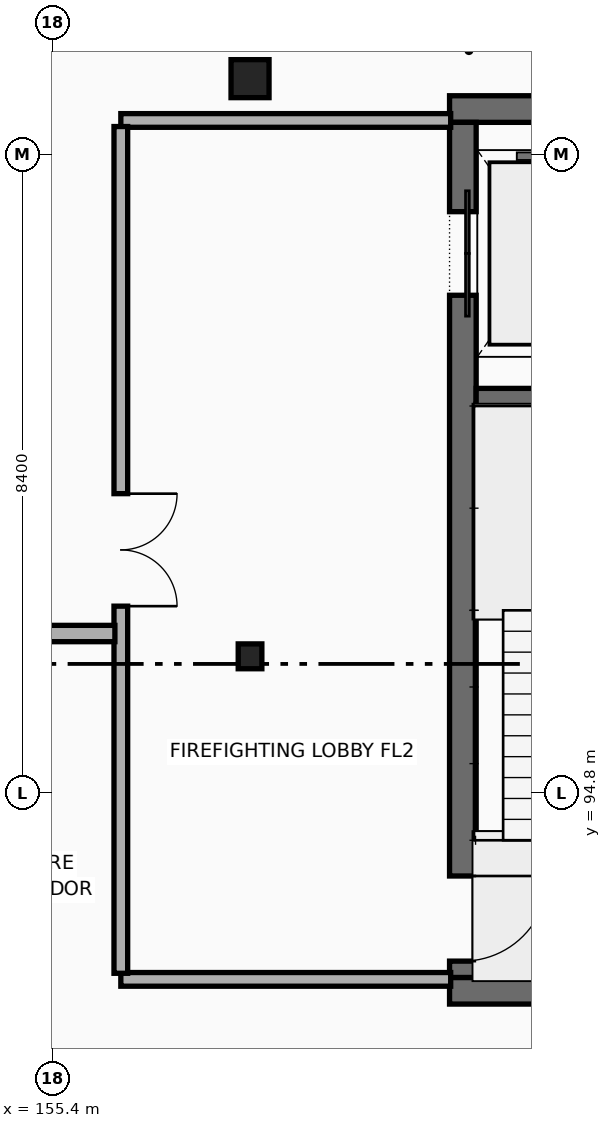
"""IFC4 building model, lengths in metres.
Left out: names, types, materials, properties, quantities, classifications, styles, units other than length and angle.
Written with IfcOpenShell. Run it as: python <this file> out.ifc"""

import sys

from ifc_helpers import new_model, si_unit, direction, frame, frame_2d, origin, origin_2d, place, context, subcontext, project, spatial, rectangle, i_section, extrude, element, fill, save


model = new_model("IFC4")
c1 = context("Model", 3, precision=1e-05, world=origin(), true_north=direction((0.0, 1.0)))
c2 = subcontext(c1, "Body", "Model", "MODEL_VIEW")
j1 = project(units=[si_unit("LENGTHUNIT", "METRE"), si_unit("PLANEANGLEUNIT", "RADIAN")], contexts=[c1])
p1 = place(None, origin())
s1 = spatial("IfcSite", under=j1, at=p1, CompositionType="ELEMENT")
p2 = place(p1, origin())
s2 = spatial("IfcBuilding", under=s1, at=p2, CompositionType="ELEMENT")
p3 = place(p2, frame((0.0, 0.0, -4.2)))
s3 = spatial("IfcBuildingStorey", under=s2, at=p3, CompositionType="ELEMENT", Elevation=-4.2)
for number, where, z_axis, x_axis in (
    (1, (160.625, 92.2, -0.415), (0.0, 0.0, 1.0), (1.0, 0.0, 0.0)),
    (2, (165.375, 103.8, -0.415), (0.0, 0.0, 1.0), (-1.0, 0.0, 0.0)),
):
    element("IfcWall", number, at=place(p3, frame(where, z_axis=z_axis, x_axis=x_axis)), inside=s3, PredefinedType="SHEAR", context=c2, shape_type="SweptSolid", body=[
        extrude(rectangle(XDim=4.75, YDim=0.35, at=frame_2d((2.375, 0.0))), origin(), (0.0, 0.0, 1.0), 4.615),
    ])
p4 = place(p3, frame((160.8, 103.625, -0.415), z_axis=(0.0, 0.0, 1.0), x_axis=(0.0, -1.0, 0.0)))
e3 = element("IfcWall", 3, at=p4, inside=s3, PredefinedType="SHEAR", context=c2, shape_type="SweptSolid", body=[
    extrude(rectangle(XDim=11.25, YDim=0.35, at=frame_2d((5.625, 0.0))), origin(), (0.0, 0.0, 1.0), 4.615),
])
p5 = place(p4, frame((1.175, 0.0, 0.415)))
e4 = element("IfcOpeningElement", 4, at=p5, cuts=e3, PredefinedType="OPENING", context=c2, shape_type="SweptSolid", body=[
    extrude(rectangle(XDim=1.1, YDim=2.2, at=frame_2d((0.55, 1.1))), frame((0.0, 0.185, 0.0), z_axis=(0.0, -1.0, 0.0), x_axis=(1.0, 0.0, 0.0)), (0.0, 0.0, 1.0), 0.37),
])
p6 = place(p4, frame((9.915, 0.0, 0.415)))
e5 = element("IfcOpeningElement", 5, at=p6, cuts=e3, PredefinedType="OPENING", context=c2, shape_type="SweptSolid", body=[
    extrude(rectangle(XDim=1.12, YDim=2.16, at=frame_2d((0.56, 1.08))), frame((0.0, 0.185, 0.0), z_axis=(0.0, -1.0, 0.0), x_axis=(1.0, 0.0, 0.0)), (0.0, 0.0, 1.0), 0.37),
])
p7 = place(p3, frame((160.975, 100.0, -0.415), z_axis=(0.0, 0.0, 1.0), x_axis=(1.0, 0.0, 0.0)))
e6 = element("IfcWall", 6, at=p7, inside=s3, PredefinedType="SHEAR", context=c2, shape_type="SweptSolid", body=[
    extrude(rectangle(XDim=4.05, YDim=0.25, at=frame_2d((2.025, 0.0))), origin(), (0.0, 0.0, 1.0), 4.615),
])
p8 = place(p3, frame((158.0, 96.6, -0.415), z_axis=(0.0, 0.0, 1.0), x_axis=(1.0, 0.0, 0.0)))
e7 = element("IfcColumn", 7, at=p8, inside=s3, PredefinedType="COLUMN", context=c2, shape_type="SweptSolid", body=[
    extrude(i_section(OverallWidth=0.311, OverallDepth=0.327, WebThickness=0.016, FlangeThickness=0.025, at=origin_2d()), origin(), (0.0, 0.0, 1.0), 4.615),
])
p9 = place(p3, frame((158.0, 104.2, -0.415), z_axis=(0.0, 0.0, 1.0), x_axis=(1.0, 0.0, 0.0)))
e8 = element("IfcColumn", 8, at=p9, inside=s3, PredefinedType="COLUMN", context=c2, shape_type="SweptSolid", body=[
    extrude(rectangle(XDim=0.5, YDim=0.5, at=origin_2d()), origin(), (0.0, 0.0, 1.0), 4.615),
])
p10 = place(p3, frame((156.3, 92.35, 0.0), z_axis=(0.0, 0.0, 1.0), x_axis=(1.0, 0.0, 0.0)))
e9 = element("IfcWall", 9, at=p10, inside=s3, PredefinedType="PARTITIONING", context=c2, shape_type="SweptSolid", body=[
    extrude(rectangle(XDim=4.34, YDim=0.18, at=frame_2d((2.17, 0.0))), origin(), (0.0, 0.0, 1.0), 3.457),
])
p11 = place(p3, frame((160.64, 103.65, 0.0), z_axis=(0.0, 0.0, 1.0), x_axis=(-1.0, 0.0, 0.0)))
e10 = element("IfcWall", 10, at=p11, inside=s3, PredefinedType="PARTITIONING", context=c2, shape_type="SweptSolid", body=[
    extrude(rectangle(XDim=4.34, YDim=0.18, at=frame_2d((2.17, 0.0))), origin(), (0.0, 0.0, 1.0), 3.417),
])
p12 = place(p3, frame((156.3, 103.57, 0.0), z_axis=(0.0, 0.0, 1.0), x_axis=(0.0, -1.0, 0.0)))
e11 = element("IfcWall", 11, at=p12, inside=s3, PredefinedType="PARTITIONING", context=c2, shape_type="SweptSolid", body=[
    extrude(rectangle(XDim=11.14, YDim=0.18, at=frame_2d((5.57, 0.0))), origin(), (0.0, 0.0, 1.0), 3.413),
])
p13 = place(p12, frame((4.83, 0.0, 0.0)))
e12 = element("IfcOpeningElement", 12, at=p13, cuts=e11, PredefinedType="OPENING", context=c2, shape_type="SweptSolid", body=[
    extrude(rectangle(XDim=1.48, YDim=2.22, at=frame_2d((0.74, 1.11))), frame((0.0, 0.1, 0.0), z_axis=(0.0, -1.0, 0.0), x_axis=(1.0, 0.0, 0.0)), (0.0, 0.0, 1.0), 0.2),
])
p14 = place(p3, frame((145.388, 96.9, 0.0), z_axis=(0.0, 0.0, 1.0), x_axis=(1.0, 0.0, 0.0)))
e13 = element("IfcWall", 13, at=p14, inside=s3, PredefinedType="PARTITIONING", context=c2, shape_type="SweptSolid", body=[
    extrude(rectangle(XDim=10.834, YDim=0.215, at=frame_2d((5.417, 0.0))), origin(), (0.0, 0.0, 1.0), 3.108),
])
p15 = place(p5, origin())
e14 = element("IfcDoor", 14, at=p15, inside=s3, OperationType="DOUBLE_DOOR_SLIDING", PredefinedType="DOOR", context=c2, shape_type="SweptSolid", body=[
    extrude(rectangle(XDim=1.1, YDim=2.2, at=frame_2d((0.55, 1.1))), frame((0.0, 0.025, 0.0), z_axis=(0.0, -1.0, 0.0), x_axis=(1.0, 0.0, 0.0)), (0.0, 0.0, 1.0), 0.05),
])
fill(e4, e14)
p16 = place(p6, origin())
e15 = element("IfcDoor", 15, at=p16, inside=s3, OperationType="SINGLE_SWING_LEFT", PredefinedType="DOOR", context=c2, shape_type="SweptSolid", body=[
    extrude(rectangle(XDim=1.12, YDim=2.16, at=frame_2d((0.56, 1.08))), frame((0.0, 0.025, 0.0), z_axis=(0.0, -1.0, 0.0), x_axis=(1.0, 0.0, 0.0)), (0.0, 0.0, 1.0), 0.05),
])
fill(e5, e15)
p17 = place(p13, origin())
e16 = element("IfcDoor", 16, at=p17, inside=s3, OperationType="DOUBLE_DOOR_SINGLE_SWING", PredefinedType="DOOR", context=c2, shape_type="SweptSolid", body=[
    extrude(rectangle(XDim=1.48, YDim=2.22, at=frame_2d((0.74, 1.11))), frame((0.0, 0.025, 0.0), z_axis=(0.0, -1.0, 0.0), x_axis=(1.0, 0.0, 0.0)), (0.0, 0.0, 1.0), 0.05),
])
fill(e12, e16)
save(model, sys.argv[1])
